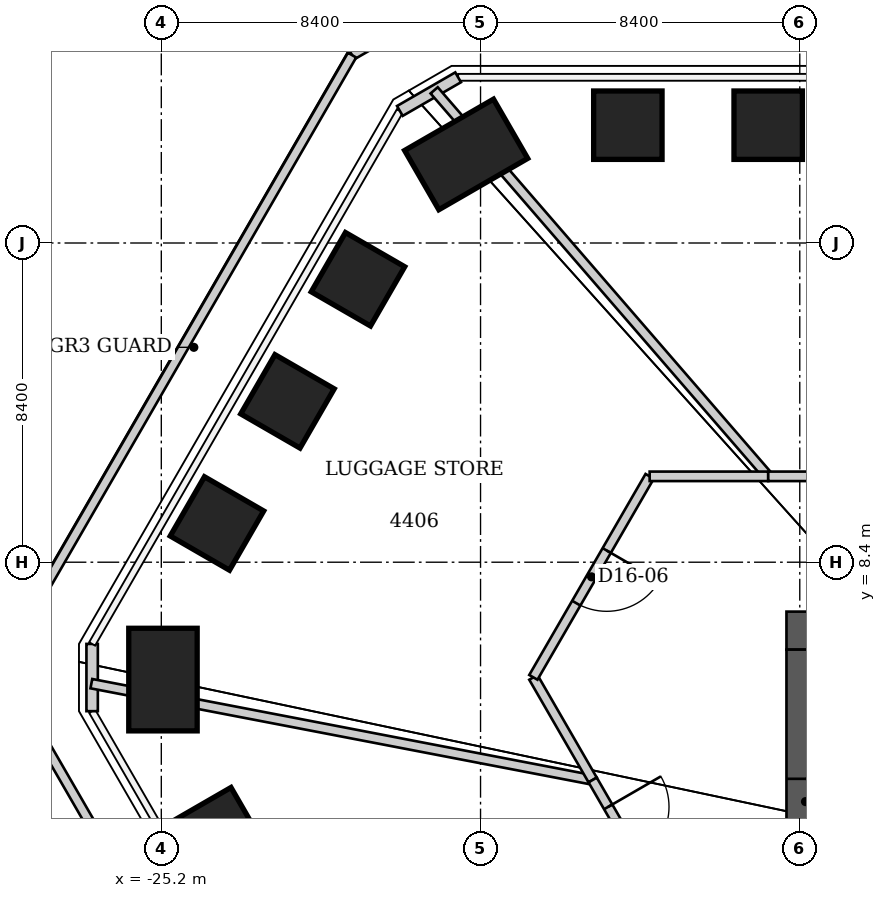
"""IFC4 building model, lengths in metres.
Left out: names, types, materials, properties, quantities, classifications, styles, units other than length and angle.
Written with IfcOpenShell. Run it as: python <this file> out.ifc"""

import sys

from ifc_helpers import new_model, si_unit, direction, frame, frame_2d, origin, origin_2d, place, context, subcontext, project, spatial, rectangle, extrude, clip, halfspace, element, fill, save


model = new_model("IFC4")
c1 = context("Model", 3, precision=1e-05, world=origin(), true_north=direction((0.0, 1.0)))
c2 = subcontext(c1, "Body", "Model", "MODEL_VIEW")
j1 = project(units=[si_unit("LENGTHUNIT", "METRE"), si_unit("PLANEANGLEUNIT", "RADIAN")], contexts=[c1])
p1 = place(None, origin())
s1 = spatial("IfcSite", under=j1, at=p1, CompositionType="ELEMENT")
p2 = place(p1, origin())
s2 = spatial("IfcBuilding", under=s1, at=p2, CompositionType="ELEMENT")
p3 = place(p2, frame((0.0, 0.0, 178.2)))
s3 = spatial("IfcBuildingStorey", under=s2, at=p3, CompositionType="ELEMENT", Elevation=178.2)
p4 = place(p3, frame((-12.924, 19.9, -0.07), z_axis=(0.0, 0.0, 1.0), x_axis=(0.0, 1.0, 0.0)))
e1 = element("IfcColumn", 1, at=p4, inside=s3, PredefinedType="COLUMN", context=c2, shape_type="SweptSolid", body=[
    clip(extrude(rectangle(XDim=1.8, YDim=1.8, at=origin_2d()), origin(), (0.0, 0.0, 1.0), 5.07), halfspace(frame((0.0, 0.0, 0.07)), True)),
])
p5 = place(p3, frame((-9.231, 19.9, -0.062), z_axis=(0.0, 0.0, 1.0), x_axis=(0.0, 1.0, 0.0)))
e2 = element("IfcColumn", 2, at=p5, inside=s3, PredefinedType="COLUMN", context=c2, shape_type="SweptSolid", body=[
    clip(extrude(rectangle(XDim=1.8, YDim=1.8, at=origin_2d()), origin(), (0.0, 0.0, 1.0), 5.062), halfspace(frame((0.0, 0.0, 0.062)), True)),
])
p6 = place(p3, frame((-23.696, 1.242, -0.07), z_axis=(0.0, 0.0, 1.0), x_axis=(-0.866025403784, -0.5, 0.0)))
e3 = element("IfcColumn", 3, at=p6, inside=s3, PredefinedType="COLUMN", context=c2, shape_type="SweptSolid", body=[
    clip(extrude(rectangle(XDim=1.8, YDim=1.8, at=origin_2d()), origin(), (0.0, 0.0, 1.0), 5.07), halfspace(frame((0.0, 0.0, 0.07)), True)),
])
p7 = place(p3, frame((-25.156, 5.311, -0.071), z_axis=(0.0, 0.0, 1.0), x_axis=(-1.0, 0.0, 0.0)))
e4 = element("IfcColumn", 4, at=p7, inside=s3, PredefinedType="COLUMN", context=c2, shape_type="SweptSolid", body=[
    clip(extrude(rectangle(XDim=1.8, YDim=2.7, at=origin_2d()), origin(), (0.0, 0.0, 1.0), 5.071), halfspace(frame((0.0, 0.0, 0.071)), True)),
])
p8 = place(p3, frame((-23.735, 9.419, -0.061), z_axis=(0.0, 0.0, 1.0), x_axis=(-0.866025403784, 0.5, 0.0)))
e5 = element("IfcColumn", 5, at=p8, inside=s3, PredefinedType="COLUMN", context=c2, shape_type="SweptSolid", body=[
    clip(extrude(rectangle(XDim=1.8, YDim=1.8, at=origin_2d()), origin(), (0.0, 0.0, 1.0), 5.061), halfspace(frame((0.0, 0.0, 0.061)), True)),
])
p9 = place(p3, frame((-21.88, 12.633, -0.053), z_axis=(0.0, 0.0, 1.0), x_axis=(-0.866025403784, 0.5, 0.0)))
e6 = element("IfcColumn", 6, at=p9, inside=s3, PredefinedType="COLUMN", context=c2, shape_type="SweptSolid", body=[
    clip(extrude(rectangle(XDim=1.8, YDim=1.8, at=origin_2d()), origin(), (0.0, 0.0, 1.0), 5.053), halfspace(frame((0.0, 0.0, 0.053)), True)),
])
p10 = place(p3, frame((-20.025, 15.846, -0.061), z_axis=(0.0, 0.0, 1.0), x_axis=(-0.866025403784, 0.5, 0.0)))
e7 = element("IfcColumn", 7, at=p10, inside=s3, PredefinedType="COLUMN", context=c2, shape_type="SweptSolid", body=[
    clip(extrude(rectangle(XDim=1.8, YDim=1.8, at=origin_2d()), origin(), (0.0, 0.0, 1.0), 5.061), halfspace(frame((0.0, 0.0, 0.061)), True)),
])
p11 = place(p3, frame((-17.178, 19.131, -0.071), z_axis=(0.0, 0.0, 1.0), x_axis=(-0.5, 0.866025403784, 0.0)))
e8 = element("IfcColumn", 8, at=p11, inside=s3, PredefinedType="COLUMN", context=c2, shape_type="SweptSolid", body=[
    clip(extrude(rectangle(XDim=1.8, YDim=2.7, at=origin_2d()), origin(), (0.0, 0.0, 1.0), 5.071), halfspace(frame((0.0, 0.0, 0.071)), True)),
])
p12 = place(p3, frame((-8.75, 6.6, 0.0), z_axis=(0.0, 0.0, 1.0), x_axis=(1.0, 0.0, 0.0)))
e9 = element("IfcWall", 9, at=p12, inside=s3, PredefinedType="SHEAR", context=c2, shape_type="SweptSolid", body=[
    extrude(rectangle(XDim=17.5, YDim=1.0, at=frame_2d((8.75, 0.0))), origin(), (0.0, 0.0, 1.0), 5.0),
])
p13 = place(p12, frame((1.637, 0.0, 0.0)))
e10 = element("IfcOpeningElement", 10, at=p13, cuts=e9, PredefinedType="OPENING", context=c2, shape_type="SweptSolid", body=[
    extrude(rectangle(XDim=1.1, YDim=2.1, at=frame_2d((0.55, 1.05))), frame((0.0, 0.5, 0.0), z_axis=(0.0, -1.0, 0.0), x_axis=(1.0, 0.0, 0.0)), (0.0, 0.0, 1.0), 1.0),
])
p14 = place(p12, frame((4.262, 0.0, 0.0)))
e11 = element("IfcOpeningElement", 11, at=p14, cuts=e9, PredefinedType="OPENING", context=c2, shape_type="SweptSolid", body=[
    extrude(rectangle(XDim=1.1, YDim=2.1, at=frame_2d((0.55, 1.05))), frame((0.0, 0.5, 0.0), z_axis=(0.0, -1.0, 0.0), x_axis=(1.0, 0.0, 0.0)), (0.0, 0.0, 1.0), 1.0),
])
p15 = place(p12, frame((6.887, 0.0, 0.0)))
e12 = element("IfcOpeningElement", 12, at=p15, cuts=e9, PredefinedType="OPENING", context=c2, shape_type="SweptSolid", body=[
    extrude(rectangle(XDim=1.1, YDim=2.1, at=frame_2d((0.55, 1.05))), frame((0.0, 0.5, 0.0), z_axis=(0.0, -1.0, 0.0), x_axis=(1.0, 0.0, 0.0)), (0.0, 0.0, 1.0), 1.0),
])
p16 = place(p12, frame((9.512, 0.0, 0.0)))
e13 = element("IfcOpeningElement", 13, at=p16, cuts=e9, PredefinedType="OPENING", context=c2, shape_type="SweptSolid", body=[
    extrude(rectangle(XDim=1.1, YDim=2.1, at=frame_2d((0.55, 1.05))), frame((0.0, 0.5, 0.0), z_axis=(0.0, -1.0, 0.0), x_axis=(1.0, 0.0, 0.0)), (0.0, 0.0, 1.0), 1.0),
])
p17 = place(p12, frame((12.137, 0.0, 0.0)))
e14 = element("IfcOpeningElement", 14, at=p17, cuts=e9, PredefinedType="OPENING", context=c2, shape_type="SweptSolid", body=[
    extrude(rectangle(XDim=1.1, YDim=2.1, at=frame_2d((0.55, 1.05))), frame((0.0, 0.5, 0.0), z_axis=(0.0, -1.0, 0.0), x_axis=(1.0, 0.0, 0.0)), (0.0, 0.0, 1.0), 1.0),
])
p18 = place(p12, frame((14.762, 0.0, 0.0)))
e15 = element("IfcOpeningElement", 15, at=p18, cuts=e9, PredefinedType="OPENING", context=c2, shape_type="SweptSolid", body=[
    extrude(rectangle(XDim=1.1, YDim=2.1, at=frame_2d((0.55, 1.05))), frame((0.0, 0.5, 0.0), z_axis=(0.0, -1.0, 0.0), x_axis=(1.0, 0.0, 0.0)), (0.0, 0.0, 1.0), 1.0),
])
p19 = place(p3, frame((-8.25, -6.1, 0.0), z_axis=(0.0, 0.0, 1.0), x_axis=(0.0, 1.0, 0.0)))
e16 = element("IfcWall", 16, at=p19, inside=s3, PredefinedType="SHEAR", context=c2, shape_type="SweptSolid", body=[
    extrude(rectangle(XDim=12.2, YDim=1.0, at=frame_2d((6.1, 0.0))), origin(), (0.0, 0.0, 1.0), 5.0),
])
p20 = place(p19, frame((7.6, 0.0, 0.0)))
e17 = element("IfcOpeningElement", 17, at=p20, cuts=e16, PredefinedType="OPENING", context=c2, shape_type="SweptSolid", body=[
    extrude(rectangle(XDim=1.2, YDim=2.2, at=frame_2d((0.6, 1.1))), frame((0.0, 0.5, 0.0), z_axis=(0.0, -1.0, 0.0), x_axis=(1.0, 0.0, 0.0)), (0.0, 0.0, 1.0), 1.0),
])
for number, where, z_axis, x_axis in (
    (18, (-27.02, 4.48, 0.0), (0.0, 0.0, 1.0), (0.0, 1.0, 0.0)),
    (19, (-18.923, 20.275, 0.0), (0.0, 0.0, 1.0), (0.866, 0.5, 0.0)),
):
    element("IfcWall", number, at=place(p3, frame(where, z_axis=z_axis, x_axis=x_axis)), inside=s3, PredefinedType="SOLIDWALL", context=c2, shape_type="SweptSolid", body=[
        extrude(rectangle(XDim=1.77, YDim=0.3, at=frame_2d((0.885, 0.0))), origin(), (0.0, 0.0, 1.0), 4.84),
    ])
p21 = place(p3, frame((-18.56, 22.678, 0.0), z_axis=(0.0, 0.0, 1.0), x_axis=(-0.86651128649, -0.499157480546, 0.0)))
e20 = element("IfcWall", 20, at=p21, inside=s3, PredefinedType="PARAPET", context=c2, shape_type="SweptSolid", body=[
    extrude(rectangle(XDim=1.871, YDim=0.25, at=frame_2d((0.936, 0.0))), origin(), (0.0, 0.0, 1.0), 1.1),
])
p22 = place(p3, frame((-20.181, 21.744, 0.0), z_axis=(0.0, 0.0, 1.0), x_axis=(-0.500000912942, -0.866024876697, 0.0)))
e21 = element("IfcWall", 21, at=p22, inside=s3, PredefinedType="PARAPET", context=c2, shape_type="SweptSolid", body=[
    extrude(rectangle(XDim=17.481, YDim=0.25, at=frame_2d((8.74, 0.0))), origin(), (0.0, 0.0, 1.0), 1.1),
])
p23 = place(p3, frame((-28.919, 4.734, 0.0), z_axis=(0.0, 0.0, 1.0), x_axis=(0.500001430823, -0.866024577697, 0.0)))
e22 = element("IfcWall", 22, at=p23, inside=s3, PredefinedType="PARAPET", context=c2, shape_type="SweptSolid", body=[
    extrude(rectangle(XDim=37.119, YDim=0.25, at=frame_2d((18.56, 0.0))), origin(), (0.0, 0.0, 1.0), 1.1),
])
p24 = place(p3, frame((-27.041, 5.204, 0.0), z_axis=(0.0, 0.0, 1.0), x_axis=(0.982036771594, -0.188689637335, 0.0)))
e23 = element("IfcWall", 23, at=p24, inside=s3, PredefinedType="PARTITIONING", context=c2, shape_type="SweptSolid", body=[
    extrude(rectangle(XDim=13.432, YDim=0.25, at=frame_2d((6.716, 0.0))), origin(), (0.0, 0.0, 1.0), 4.84),
])
p25 = place(p3, frame((-15.41, 5.37, 0.0), z_axis=(0.0, 0.0, 1.0), x_axis=(0.50020585531, -0.86590652054, 0.0)))
e24 = element("IfcWall", 24, at=p25, inside=s3, PredefinedType="PARTITIONING", context=c2, shape_type="SweptSolid", body=[
    extrude(rectangle(XDim=3.118, YDim=0.25, at=frame_2d((1.559, 0.0))), origin(), (0.0, 0.0, 1.0), 4.84),
])
p26 = place(p3, frame((-13.85, 2.67, 0.0), z_axis=(0.0, 0.0, 1.0), x_axis=(0.50081313458, -0.865555431057, 0.0)))
e25 = element("IfcWall", 25, at=p26, inside=s3, PredefinedType="PARTITIONING", context=c2, shape_type="SweptSolid", body=[
    extrude(rectangle(XDim=3.235, YDim=0.25, at=frame_2d((1.617, 0.0))), origin(), (0.0, 0.0, 1.0), 4.84),
])
p27 = place(p26, frame((0.817, 0.0, 0.0)))
e26 = element("IfcOpeningElement", 26, at=p27, cuts=e25, PredefinedType="OPENING", context=c2, shape_type="SweptSolid", body=[
    extrude(rectangle(XDim=1.6, YDim=2.4, at=frame_2d((0.8, 1.2))), frame((0.0, 0.125, 0.0), z_axis=(0.0, -1.0, 0.0), x_axis=(1.0, 0.0, 0.0)), (0.0, 0.0, 1.0), 0.25),
])
p28 = place(p3, frame((-12.35, 10.66, 0.0), z_axis=(0.0, 0.0, 1.0), x_axis=(-0.500688204455, -0.865627703992, 0.0)))
e27 = element("IfcWall", 27, at=p28, inside=s3, PredefinedType="PARTITIONING", context=c2, shape_type="SweptSolid", body=[
    extrude(rectangle(XDim=6.111, YDim=0.25, at=frame_2d((3.056, 0.0))), origin(), (0.0, 0.0, 1.0), 4.84),
])
p29 = place(p28, frame((2.256, 0.0, 0.0)))
e28 = element("IfcOpeningElement", 28, at=p29, cuts=e27, PredefinedType="OPENING", context=c2, shape_type="SweptSolid", body=[
    extrude(rectangle(XDim=1.6, YDim=2.4, at=frame_2d((0.8, 1.2))), frame((0.0, 0.125, 0.0), z_axis=(0.0, -1.0, 0.0), x_axis=(1.0, 0.0, 0.0)), (0.0, 0.0, 1.0), 0.25),
])
p30 = place(p3, frame((-9.23, 10.66, 0.0), z_axis=(0.0, 0.0, 1.0), x_axis=(-0.654394130992, 0.756153636058, 0.0)))
e29 = element("IfcWall", 29, at=p30, inside=s3, PredefinedType="PARTITIONING", context=c2, shape_type="SweptSolid", body=[
    extrude(rectangle(XDim=13.433, YDim=0.25, at=frame_2d((6.717, 0.0))), origin(), (0.0, 0.0, 1.0), 4.84),
])
p31 = place(p3, frame((-9.23, 10.66, 0.0), z_axis=(0.0, 0.0, 1.0), x_axis=(-1.0, 0.0, 0.0)))
e30 = element("IfcWall", 30, at=p31, inside=s3, PredefinedType="PARTITIONING", context=c2, shape_type="SweptSolid", body=[
    extrude(rectangle(XDim=3.12, YDim=0.25, at=frame_2d((1.56, 0.0))), origin(), (0.0, 0.0, 1.0), 4.84),
])
p32 = place(p3, frame((9.23, 10.66, 0.0), z_axis=(0.0, 0.0, 1.0), x_axis=(-1.0, 0.0, 0.0)))
e31 = element("IfcWall", 31, at=p32, inside=s3, PredefinedType="PARTITIONING", context=c2, shape_type="SweptSolid", body=[
    extrude(rectangle(XDim=18.46, YDim=0.25, at=frame_2d((9.23, 0.0))), origin(), (0.0, 0.0, 1.0), 4.84),
])
p33 = place(p32, frame((8.43, 0.0, 0.0)))
e32 = element("IfcOpeningElement", 32, at=p33, cuts=e31, PredefinedType="OPENING", context=c2, shape_type="SweptSolid", body=[
    extrude(rectangle(XDim=1.6, YDim=2.4, at=frame_2d((0.8, 1.2))), frame((0.0, 0.125, 0.0), z_axis=(0.0, -1.0, 0.0), x_axis=(1.0, 0.0, 0.0)), (0.0, 0.0, 1.0), 0.25),
])
p34 = place(p27, origin())
e33 = element("IfcDoor", 33, at=p34, inside=s3, OperationType="DOUBLE_DOOR_SINGLE_SWING", PredefinedType="DOOR", context=c2, shape_type="SweptSolid", body=[
    extrude(rectangle(XDim=1.6, YDim=2.4, at=frame_2d((0.8, 1.2))), frame((0.0, 0.025, 0.0), z_axis=(0.0, -1.0, 0.0), x_axis=(1.0, 0.0, 0.0)), (0.0, 0.0, 1.0), 0.05),
])
fill(e26, e33)
p35 = place(p29, origin())
e34 = element("IfcDoor", 34, at=p35, inside=s3, OperationType="DOUBLE_DOOR_SINGLE_SWING", PredefinedType="DOOR", context=c2, shape_type="SweptSolid", body=[
    extrude(rectangle(XDim=1.6, YDim=2.4, at=frame_2d((0.8, 1.2))), frame((0.0, 0.025, 0.0), z_axis=(0.0, -1.0, 0.0), x_axis=(1.0, 0.0, 0.0)), (0.0, 0.0, 1.0), 0.05),
])
fill(e28, e34)
p36 = place(p20, origin())
e35 = element("IfcDoor", 35, at=p36, inside=s3, OperationType="SINGLE_SWING_RIGHT", PredefinedType="DOOR", context=c2, shape_type="SweptSolid", body=[
    extrude(rectangle(XDim=1.2, YDim=2.2, at=frame_2d((0.6, 1.1))), frame((0.0, 0.025, 0.0), z_axis=(0.0, -1.0, 0.0), x_axis=(1.0, 0.0, 0.0)), (0.0, 0.0, 1.0), 0.05),
])
fill(e17, e35)
save(model, sys.argv[1])
